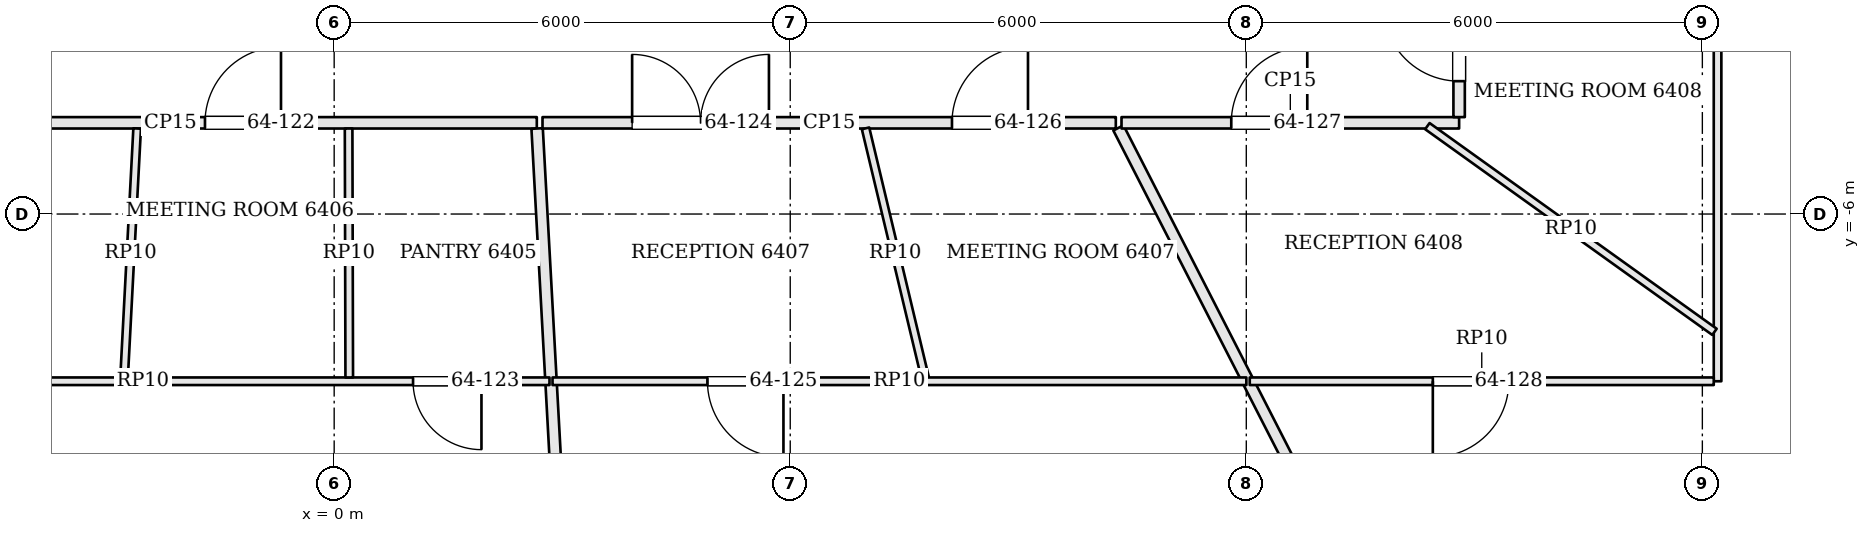
"""IFC4 building model, lengths in metres.
Left out: names, types, materials, properties, quantities, classifications, styles, units other than length and angle.
Written with IfcOpenShell. Run it as: python <this file> out.ifc"""

import sys

from ifc_helpers import new_model, si_unit, direction, frame, frame_2d, origin, place, context, subcontext, project, spatial, rectangle, extrude, element, fill, save


model = new_model("IFC4")
c1 = context("Model", 3, precision=1e-05, world=origin(), true_north=direction((0.0, 1.0)))
c2 = subcontext(c1, "Body", "Model", "MODEL_VIEW")
j1 = project(units=[si_unit("LENGTHUNIT", "METRE"), si_unit("PLANEANGLEUNIT", "RADIAN")], contexts=[c1])
p1 = place(None, origin())
s1 = spatial("IfcSite", under=j1, at=p1, CompositionType="ELEMENT")
p2 = place(p1, origin())
s2 = spatial("IfcBuilding", under=s1, at=p2, CompositionType="ELEMENT")
p3 = place(p2, frame((0.0, 0.0, 260.4)))
s3 = spatial("IfcBuildingStorey", under=s2, at=p3, CompositionType="ELEMENT", Elevation=260.4)
p4 = place(p3, frame((-6.974, -4.8, 0.0), z_axis=(0.0, 0.0, 1.0), x_axis=(1.0, 0.0, 0.0)))
e1 = element("IfcWall", 1, at=p4, inside=s3, PredefinedType="PARTITIONING", context=c2, shape_type="SweptSolid", body=[
    extrude(rectangle(XDim=9.64, YDim=0.15, at=frame_2d((4.82, 0.0))), origin(), (0.0, 0.0, 1.0), 2.984),
])
p5 = place(p4, frame((1.255, 0.0, 0.0)))
e2 = element("IfcOpeningElement", 2, at=p5, cuts=e1, PredefinedType="OPENING", context=c2, shape_type="SweptSolid", body=[
    extrude(rectangle(XDim=1.8, YDim=2.1, at=frame_2d((0.9, 1.05))), frame((0.0, 0.085, 0.0), z_axis=(0.0, -1.0, 0.0), x_axis=(1.0, 0.0, 0.0)), (0.0, 0.0, 1.0), 0.17),
])
p6 = place(p4, frame((5.274, 0.0, 0.0)))
e3 = element("IfcOpeningElement", 3, at=p6, cuts=e1, PredefinedType="OPENING", context=c2, shape_type="SweptSolid", body=[
    extrude(rectangle(XDim=1.0, YDim=2.4, at=frame_2d((0.5, 1.2))), frame((0.0, 0.085, 0.0), z_axis=(0.0, -1.0, 0.0), x_axis=(1.0, 0.0, 0.0)), (0.0, 0.0, 1.0), 0.17),
])
p7 = place(p3, frame((3.38, -17.801, 0.0), z_axis=(0.0, 0.0, 1.0), x_axis=(-0.054879866406, 0.998492964554, 0.0)))
e4 = element("IfcWall", 4, at=p7, inside=s3, PredefinedType="PARTITIONING", context=c2, shape_type="SweptSolid", body=[
    extrude(rectangle(XDim=12.946, YDim=0.15, at=frame_2d((6.473, 0.0))), origin(), (0.0, 0.0, 1.0), 2.58),
])
p8 = place(p3, frame((2.741, -4.8, 0.0), z_axis=(0.0, 0.0, 1.0), x_axis=(1.0, 0.0, 0.0)))
e5 = element("IfcWall", 5, at=p8, inside=s3, PredefinedType="PARTITIONING", context=c2, shape_type="SweptSolid", body=[
    extrude(rectangle(XDim=7.542, YDim=0.15, at=frame_2d((3.771, 0.0))), origin(), (0.0, 0.0, 1.0), 2.984),
])
p9 = place(p8, frame((1.179, 0.0, 0.0)))
e6 = element("IfcOpeningElement", 6, at=p9, cuts=e5, PredefinedType="OPENING", context=c2, shape_type="SweptSolid", body=[
    extrude(rectangle(XDim=1.8, YDim=2.1, at=frame_2d((0.9, 1.05))), frame((0.0, 0.085, 0.0), z_axis=(0.0, -1.0, 0.0), x_axis=(1.0, 0.0, 0.0)), (0.0, 0.0, 1.0), 0.17),
])
p10 = place(p8, frame((5.387, 0.0, 0.0)))
e7 = element("IfcOpeningElement", 7, at=p10, cuts=e5, PredefinedType="OPENING", context=c2, shape_type="SweptSolid", body=[
    extrude(rectangle(XDim=1.0, YDim=2.4, at=frame_2d((0.5, 1.2))), frame((0.0, 0.085, 0.0), z_axis=(0.0, -1.0, 0.0), x_axis=(1.0, 0.0, 0.0)), (0.0, 0.0, 1.0), 0.17),
])
p11 = place(p3, frame((16.078, -16.125, 0.0), z_axis=(0.0, 0.0, 1.0), x_axis=(-0.455549457852, 0.890210475927, 0.0)))
e8 = element("IfcWall", 8, at=p11, inside=s3, PredefinedType="PARTITIONING", context=c2, shape_type="SweptSolid", body=[
    extrude(rectangle(XDim=12.646, YDim=0.15, at=frame_2d((6.323, 0.0))), origin(), (0.0, 0.0, 1.0), 2.984),
])
p12 = place(p3, frame((10.358, -4.8, 0.0), z_axis=(0.0, 0.0, 1.0), x_axis=(1.0, 0.0, 0.0)))
e9 = element("IfcWall", 9, at=p12, inside=s3, PredefinedType="PARTITIONING", context=c2, shape_type="SweptSolid", body=[
    extrude(rectangle(XDim=4.442, YDim=0.15, at=frame_2d((2.221, 0.0))), origin(), (0.0, 0.0, 1.0), 2.984),
])
p13 = place(p12, frame((1.444, 0.0, 0.0)))
e10 = element("IfcOpeningElement", 10, at=p13, cuts=e9, PredefinedType="OPENING", context=c2, shape_type="SweptSolid", body=[
    extrude(rectangle(XDim=1.0, YDim=2.1, at=frame_2d((0.5, 1.05))), frame((0.0, 0.085, 0.0), z_axis=(0.0, -1.0, 0.0), x_axis=(1.0, 0.0, 0.0)), (0.0, 0.0, 1.0), 0.17),
])
p14 = place(p3, frame((14.8, -4.725, 0.0), z_axis=(0.0, 0.0, 1.0), x_axis=(0.0, 1.0, 0.0)))
e11 = element("IfcWall", 11, at=p14, inside=s3, PredefinedType="PARTITIONING", context=c2, shape_type="SweptSolid", body=[
    extrude(rectangle(XDim=6.968, YDim=0.15, at=frame_2d((3.484, 0.0))), origin(), (0.0, 0.0, 1.0), 2.984),
])
p15 = place(p14, frame((0.473, 0.0, 0.0)))
e12 = element("IfcOpeningElement", 12, at=p15, cuts=e11, PredefinedType="OPENING", context=c2, shape_type="SweptSolid", body=[
    extrude(rectangle(XDim=1.0, YDim=2.4, at=frame_2d((0.5, 1.2))), frame((0.0, 0.085, 0.0), z_axis=(0.0, -1.0, 0.0), x_axis=(1.0, 0.0, 0.0)), (0.0, 0.0, 1.0), 0.17),
])
p16 = place(p14, frame((3.123, 0.0, 0.0)))
e13 = element("IfcOpeningElement", 13, at=p16, cuts=e11, PredefinedType="OPENING", context=c2, shape_type="SweptSolid", body=[
    extrude(rectangle(XDim=1.0, YDim=2.4, at=frame_2d((0.5, 1.2))), frame((0.0, 0.085, 0.0), z_axis=(0.0, -1.0, 0.0), x_axis=(1.0, 0.0, 0.0)), (0.0, 0.0, 1.0), 0.17),
])
p17 = place(p3, frame((2.833, -8.2, 0.0), z_axis=(0.0, 0.0, 1.0), x_axis=(-1.0, 0.0, 0.0)))
e14 = element("IfcWall", 14, at=p17, inside=s3, PredefinedType="PARTITIONING", context=c2, shape_type="SweptSolid", body=[
    extrude(rectangle(XDim=10.698, YDim=0.1, at=frame_2d((5.349, 0.0))), origin(), (0.0, 0.0, 1.0), 2.984),
])
p18 = place(p17, frame((7.748, 0.0, 0.0)))
e15 = element("IfcOpeningElement", 15, at=p18, cuts=e14, PredefinedType="OPENING", context=c2, shape_type="SweptSolid", body=[
    extrude(rectangle(XDim=1.0, YDim=2.1, at=frame_2d((0.5, 1.05))), frame((0.0, 0.06, 0.0), z_axis=(0.0, -1.0, 0.0), x_axis=(1.0, 0.0, 0.0)), (0.0, 0.0, 1.0), 0.12),
])
p19 = place(p17, frame((0.895, 0.0, 0.0)))
e16 = element("IfcOpeningElement", 16, at=p19, cuts=e14, PredefinedType="OPENING", context=c2, shape_type="SweptSolid", body=[
    extrude(rectangle(XDim=0.9, YDim=2.1, at=frame_2d((0.45, 1.05))), frame((0.0, 0.06, 0.0), z_axis=(0.0, -1.0, 0.0), x_axis=(1.0, 0.0, 0.0)), (0.0, 0.0, 1.0), 0.12),
])
p20 = place(p3, frame((-2.592, -4.875, 0.0), z_axis=(0.0, 0.0, 1.0), x_axis=(-0.05240645469, -0.998625837592, 0.0)))
e17 = element("IfcWall", 17, at=p20, inside=s3, PredefinedType="PARTITIONING", context=c2, shape_type="SweptSolid", body=[
    extrude(rectangle(XDim=3.28, YDim=0.1, at=frame_2d((1.64, 0.0))), origin(), (0.0, 0.0, 1.0), 2.984),
])
p21 = place(p3, frame((0.19, -4.875, 0.0), z_axis=(0.0, 0.0, 1.0), x_axis=(0.002534657133, -0.999996787751, 0.0)))
e18 = element("IfcWall", 18, at=p21, inside=s3, PredefinedType="PARTITIONING", context=c2, shape_type="SweptSolid", body=[
    extrude(rectangle(XDim=3.275, YDim=0.1, at=frame_2d((1.637, 0.0))), origin(), (0.0, 0.0, 1.0), 2.984),
])
p22 = place(p3, frame((12.001, -8.2, 0.0), z_axis=(0.0, 0.0, 1.0), x_axis=(-1.0, 0.0, 0.0)))
e19 = element("IfcWall", 19, at=p22, inside=s3, PredefinedType="PARTITIONING", context=c2, shape_type="SweptSolid", body=[
    extrude(rectangle(XDim=9.128, YDim=0.1, at=frame_2d((4.564, 0.0))), origin(), (0.0, 0.0, 1.0), 2.984),
])
p23 = place(p22, frame((6.09, 0.0, 0.0)))
e20 = element("IfcOpeningElement", 20, at=p23, cuts=e19, PredefinedType="OPENING", context=c2, shape_type="SweptSolid", body=[
    extrude(rectangle(XDim=1.0, YDim=2.1, at=frame_2d((0.5, 1.05))), frame((0.0, 0.06, 0.0), z_axis=(0.0, -1.0, 0.0), x_axis=(1.0, 0.0, 0.0)), (0.0, 0.0, 1.0), 0.12),
])
p24 = place(p3, frame((6.991, -4.873, 0.0), z_axis=(0.0, 0.0, 1.0), x_axis=(0.232348315027, -0.97263264417, 0.0)))
e21 = element("IfcWall", 21, at=p24, inside=s3, PredefinedType="PARTITIONING", context=c2, shape_type="SweptSolid", body=[
    extrude(rectangle(XDim=3.371, YDim=0.1, at=frame_2d((1.686, 0.0))), origin(), (0.0, 0.0, 1.0), 2.984),
])
p25 = place(p3, frame((18.2, 2.867, 0.0), z_axis=(0.0, 0.0, 1.0), x_axis=(0.0, -1.0, 0.0)))
e22 = element("IfcWall", 22, at=p25, inside=s3, PredefinedType="PARTITIONING", context=c2, shape_type="SweptSolid", body=[
    extrude(rectangle(XDim=11.067, YDim=0.1, at=frame_2d((5.534, 0.0))), origin(), (0.0, 0.0, 1.0), 2.984),
])
p26 = place(p25, frame((0.983, 0.0, 0.0)))
e23 = element("IfcOpeningElement", 23, at=p26, cuts=e22, PredefinedType="OPENING", context=c2, shape_type="SweptSolid", body=[
    extrude(rectangle(XDim=0.9, YDim=2.1, at=frame_2d((0.45, 1.05))), frame((0.0, 0.06, 0.0), z_axis=(0.0, -1.0, 0.0), x_axis=(1.0, 0.0, 0.0)), (0.0, 0.0, 1.0), 0.12),
])
p27 = place(p3, frame((18.15, -8.2, 0.0), z_axis=(0.0, 0.0, 1.0), x_axis=(-1.0, 0.0, 0.0)))
e24 = element("IfcWall", 24, at=p27, inside=s3, PredefinedType="PARTITIONING", context=c2, shape_type="SweptSolid", body=[
    extrude(rectangle(XDim=6.104, YDim=0.1, at=frame_2d((3.052, 0.0))), origin(), (0.0, 0.0, 1.0), 2.984),
])
p28 = place(p27, frame((2.696, 0.0, 0.0)))
e25 = element("IfcOpeningElement", 25, at=p28, cuts=e24, PredefinedType="OPENING", context=c2, shape_type="SweptSolid", body=[
    extrude(rectangle(XDim=1.0, YDim=2.1, at=frame_2d((0.5, 1.05))), frame((0.0, 0.06, 0.0), z_axis=(0.0, -1.0, 0.0), x_axis=(1.0, 0.0, 0.0)), (0.0, 0.0, 1.0), 0.12),
])
p29 = place(p3, frame((14.382, -4.844, 0.0), z_axis=(0.0, 0.0, 1.0), x_axis=(0.812905436978, -0.582395699273, 0.0)))
e26 = element("IfcWall", 26, at=p29, inside=s3, PredefinedType="PARTITIONING", context=c2, shape_type="SweptSolid", body=[
    extrude(rectangle(XDim=4.646, YDim=0.1, at=frame_2d((2.323, 0.0))), origin(), (0.0, 0.0, 1.0), 2.984),
])
p30 = place(p6, origin())
e27 = element("IfcDoor", 27, at=p30, inside=s3, OperationType="SINGLE_SWING_RIGHT", PredefinedType="DOOR", context=c2, shape_type="SweptSolid", body=[
    extrude(rectangle(XDim=1.0, YDim=2.4, at=frame_2d((0.5, 1.2))), frame((0.0, 0.025, 0.0), z_axis=(0.0, -1.0, 0.0), x_axis=(1.0, 0.0, 0.0)), (0.0, 0.0, 1.0), 0.05),
])
fill(e3, e27)
p31 = place(p19, origin())
e28 = element("IfcDoor", 28, at=p31, inside=s3, OperationType="SINGLE_SWING_LEFT", PredefinedType="DOOR", context=c2, shape_type="SweptSolid", body=[
    extrude(rectangle(XDim=0.9, YDim=2.1, at=frame_2d((0.45, 1.05))), frame((0.0, 0.025, 0.0), z_axis=(0.0, -1.0, 0.0), x_axis=(1.0, 0.0, 0.0)), (0.0, 0.0, 1.0), 0.05),
])
fill(e16, e28)
p32 = place(p9, origin())
e29 = element("IfcDoor", 29, at=p32, inside=s3, OperationType="DOUBLE_DOOR_SINGLE_SWING", PredefinedType="DOOR", context=c2, shape_type="SweptSolid", body=[
    extrude(rectangle(XDim=1.8, YDim=2.1, at=frame_2d((0.9, 1.05))), frame((0.0, 0.025, 0.0), z_axis=(0.0, -1.0, 0.0), x_axis=(1.0, 0.0, 0.0)), (0.0, 0.0, 1.0), 0.05),
])
fill(e6, e29)
p33 = place(p23, origin())
e30 = element("IfcDoor", 30, at=p33, inside=s3, OperationType="SINGLE_SWING_LEFT", PredefinedType="DOOR", context=c2, shape_type="SweptSolid", body=[
    extrude(rectangle(XDim=1.0, YDim=2.1, at=frame_2d((0.5, 1.05))), frame((0.0, 0.025, 0.0), z_axis=(0.0, -1.0, 0.0), x_axis=(1.0, 0.0, 0.0)), (0.0, 0.0, 1.0), 0.05),
])
fill(e20, e30)
p34 = place(p10, origin())
e31 = element("IfcDoor", 31, at=p34, inside=s3, OperationType="SINGLE_SWING_RIGHT", PredefinedType="DOOR", context=c2, shape_type="SweptSolid", body=[
    extrude(rectangle(XDim=1.0, YDim=2.4, at=frame_2d((0.5, 1.2))), frame((0.0, 0.025, 0.0), z_axis=(0.0, -1.0, 0.0), x_axis=(1.0, 0.0, 0.0)), (0.0, 0.0, 1.0), 0.05),
])
fill(e7, e31)
p35 = place(p13, origin())
e32 = element("IfcDoor", 32, at=p35, inside=s3, OperationType="SINGLE_SWING_RIGHT", PredefinedType="DOOR", context=c2, shape_type="SweptSolid", body=[
    extrude(rectangle(XDim=1.0, YDim=2.1, at=frame_2d((0.5, 1.05))), frame((0.0, 0.025, 0.0), z_axis=(0.0, -1.0, 0.0), x_axis=(1.0, 0.0, 0.0)), (0.0, 0.0, 1.0), 0.05),
])
fill(e10, e32)
p36 = place(p28, origin())
e33 = element("IfcDoor", 33, at=p36, inside=s3, OperationType="SINGLE_SWING_RIGHT", PredefinedType="DOOR", context=c2, shape_type="SweptSolid", body=[
    extrude(rectangle(XDim=1.0, YDim=2.1, at=frame_2d((0.5, 1.05))), frame((0.0, 0.025, 0.0), z_axis=(0.0, -1.0, 0.0), x_axis=(1.0, 0.0, 0.0)), (0.0, 0.0, 1.0), 0.05),
])
fill(e25, e33)
p37 = place(p15, origin())
e34 = element("IfcDoor", 34, at=p37, inside=s3, OperationType="SINGLE_SWING_RIGHT", PredefinedType="DOOR", context=c2, shape_type="SweptSolid", body=[
    extrude(rectangle(XDim=1.0, YDim=2.4, at=frame_2d((0.5, 1.2))), frame((0.0, 0.025, 0.0), z_axis=(0.0, -1.0, 0.0), x_axis=(1.0, 0.0, 0.0)), (0.0, 0.0, 1.0), 0.05),
])
fill(e12, e34)
save(model, sys.argv[1])
